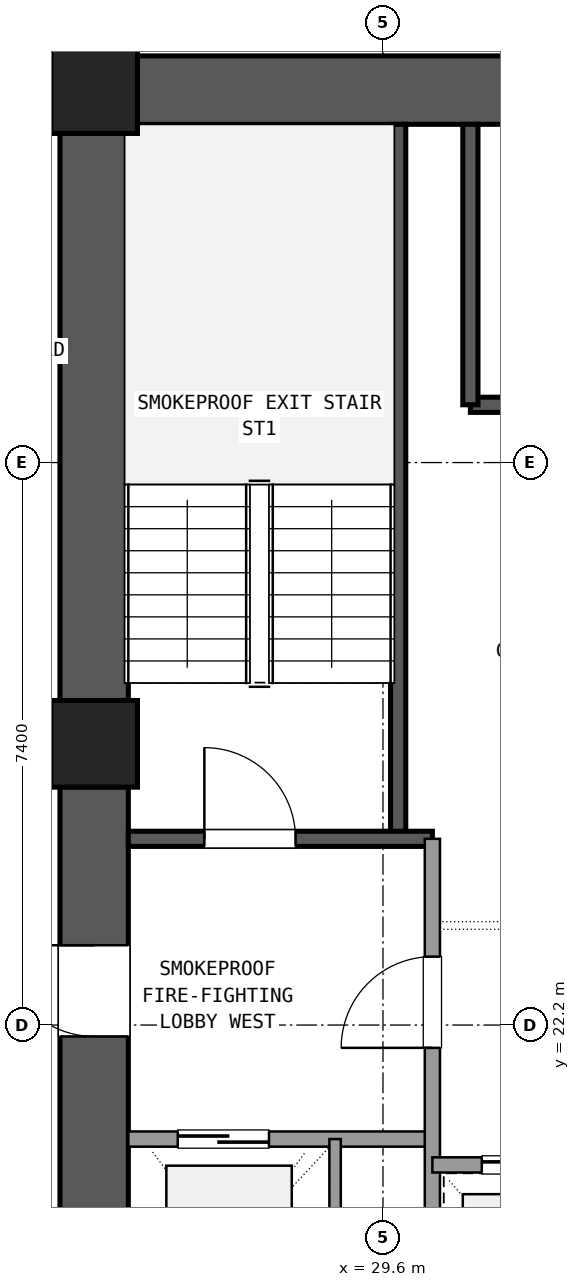
"""IFC4 building model, lengths in metres.
Left out: names, types, materials, properties, quantities, classifications, styles, units other than length and angle.
Written with IfcOpenShell. Run it as: python <this file> out.ifc"""

import sys

from ifc_helpers import new_model, si_unit, direction, frame, frame_2d, origin, origin_2d, place, context, subcontext, project, spatial, rectangle, extrude, element, fill, save


model = new_model("IFC4")
c1 = context("Model", 3, precision=1e-05, world=origin(), true_north=direction((0.0, 1.0)))
c2 = subcontext(c1, "Body", "Model", "MODEL_VIEW")
j1 = project(units=[si_unit("LENGTHUNIT", "METRE"), si_unit("PLANEANGLEUNIT", "RADIAN")], contexts=[c1])
p1 = place(None, origin())
s1 = spatial("IfcSite", under=j1, at=p1, CompositionType="ELEMENT")
p2 = place(p1, origin())
s2 = spatial("IfcBuilding", under=s1, at=p2, CompositionType="ELEMENT")
p3 = place(p2, frame((0.0, 0.0, 56.34)))
s3 = spatial("IfcBuildingStorey", under=s2, at=p3, CompositionType="ELEMENT", Elevation=56.34)
for number, where, z_axis, x_axis in (
    (1, (25.8, 34.5, 0.0), (0.0, 0.0, 1.0), (1.0, 0.0, 0.0)),
    (2, (25.8, 25.9, 0.0), (0.0, 0.0, 1.0), (1.0, 0.0, 0.0)),
):
    element("IfcColumn", number, at=place(p3, frame(where, z_axis=z_axis, x_axis=x_axis)), inside=s3, PredefinedType="COLUMN", context=c2, shape_type="SweptSolid", body=[
        extrude(rectangle(XDim=1.14, YDim=1.14, at=origin_2d()), origin(), (0.0, 0.0, 1.0), 3.6),
    ])
p4 = place(p3, frame((36.435, 34.5, 0.0), z_axis=(0.0, 0.0, 1.0), x_axis=(-1.0, 0.0, 0.0)))
e3 = element("IfcWall", 3, at=p4, inside=s3, PredefinedType="SHEAR", context=c2, shape_type="SweptSolid", body=[
    extrude(rectangle(XDim=10.07, YDim=0.9, at=frame_2d((5.035, 0.0))), origin(), (0.0, 0.0, 1.0), 3.32),
])
p5 = place(p4, frame((4.035, 0.0, 0.0)))
e4 = element("IfcOpeningElement", 4, at=p5, cuts=e3, PredefinedType="OPENING", context=c2, shape_type="SweptSolid", body=[
    extrude(rectangle(XDim=1.2, YDim=2.15, at=frame_2d((0.6, 1.075))), frame((0.0, 0.46, 0.0), z_axis=(0.0, -1.0, 0.0), x_axis=(1.0, 0.0, 0.0)), (0.0, 0.0, 1.0), 0.92),
])
p6 = place(p3, frame((25.8, 33.935, 0.0), z_axis=(0.0, 0.0, 1.0), x_axis=(0.0, -1.0, 0.0)))
e5 = element("IfcWall", 5, at=p6, inside=s3, PredefinedType="SHEAR", context=c2, shape_type="SweptSolid", body=[
    extrude(rectangle(XDim=7.47, YDim=0.9, at=frame_2d((3.735, 0.0))), origin(), (0.0, 0.0, 1.0), 3.32),
])
p7 = place(p3, frame((25.8, 25.335, 0.0), z_axis=(0.0, 0.0, 1.0), x_axis=(0.0, -1.0, 0.0)))
e6 = element("IfcWall", 6, at=p7, inside=s3, PredefinedType="SHEAR", context=c2, shape_type="SweptSolid", body=[
    extrude(rectangle(XDim=7.47, YDim=0.9, at=frame_2d((3.735, 0.0))), origin(), (0.0, 0.0, 1.0), 3.32),
])
p8 = place(p7, frame((2.085, 0.0, 0.0)))
e7 = element("IfcOpeningElement", 7, at=p8, cuts=e6, PredefinedType="OPENING", context=c2, shape_type="SweptSolid", body=[
    extrude(rectangle(XDim=1.2, YDim=2.15, at=frame_2d((0.6, 1.075))), frame((0.0, 0.46, 0.0), z_axis=(0.0, -1.0, 0.0), x_axis=(1.0, 0.0, 0.0)), (0.0, 0.0, 1.0), 0.92),
])
p9 = place(p3, frame((29.8, 24.65, 0.0), z_axis=(0.0, 0.0, 1.0), x_axis=(0.0, 1.0, 0.0)))
e8 = element("IfcWall", 8, at=p9, inside=s3, PredefinedType="SHEAR", context=c2, shape_type="SweptSolid", body=[
    extrude(rectangle(XDim=9.4, YDim=0.2, at=frame_2d((4.7, 0.0))), origin(), (0.0, 0.0, 1.0), 3.32),
])
p10 = place(p3, frame((26.25, 24.65, 0.0), z_axis=(0.0, 0.0, 1.0), x_axis=(1.0, 0.0, 0.0)))
e9 = element("IfcWall", 9, at=p10, inside=s3, PredefinedType="SHEAR", context=c2, shape_type="SweptSolid", body=[
    extrude(rectangle(XDim=4.0, YDim=0.2, at=frame_2d((2.0, 0.0))), origin(), (0.0, 0.0, 1.0), 3.32),
])
p11 = place(p10, frame((1.0, 0.0, 0.0)))
e10 = element("IfcOpeningElement", 10, at=p11, cuts=e9, PredefinedType="OPENING", context=c2, shape_type="SweptSolid", body=[
    extrude(rectangle(XDim=1.2, YDim=2.15, at=frame_2d((0.6, 1.075))), frame((0.0, 0.11, 0.0), z_axis=(0.0, -1.0, 0.0), x_axis=(1.0, 0.0, 0.0)), (0.0, 0.0, 1.0), 0.22),
])
p12 = place(p3, frame((30.75, 30.36, 0.0), z_axis=(0.0, 0.0, 1.0), x_axis=(1.0, 0.0, 0.0)))
e11 = element("IfcWall", 11, at=p12, inside=s3, PredefinedType="SHEAR", context=c2, shape_type="SweptSolid", body=[
    extrude(rectangle(XDim=9.5, YDim=0.2, at=frame_2d((4.75, 0.0))), origin(), (0.0, 0.0, 1.0), 3.32),
])
p13 = place(p3, frame((30.75, 30.36, 0.0), z_axis=(0.0, 0.0, 1.0), x_axis=(0.0, 1.0, 0.0)))
e12 = element("IfcWall", 12, at=p13, inside=s3, PredefinedType="SHEAR", context=c2, shape_type="SweptSolid", body=[
    extrude(rectangle(XDim=3.69, YDim=0.2, at=frame_2d((1.845, 0.0))), origin(), (0.0, 0.0, 1.0), 3.32),
])
p14 = place(p3, frame((26.25, 20.7, 0.0), z_axis=(0.0, 0.0, 1.0), x_axis=(1.0, 0.0, 0.0)))
e13 = element("IfcWall", 13, at=p14, inside=s3, PredefinedType="SOLIDWALL", context=c2, shape_type="SweptSolid", body=[
    extrude(rectangle(XDim=4.0, YDim=0.2, at=frame_2d((2.0, 0.0))), origin(), (0.0, 0.0, 1.0), 2.61),
])
p15 = place(p14, frame((0.65, 0.0, 0.0)))
e14 = element("IfcOpeningElement", 14, at=p15, cuts=e13, PredefinedType="OPENING", context=c2, shape_type="SweptSolid", body=[
    extrude(rectangle(XDim=1.2, YDim=2.15, at=frame_2d((0.6, 1.075))), frame((0.0, 0.11, 0.0), z_axis=(0.0, -1.0, 0.0), x_axis=(1.0, 0.0, 0.0)), (0.0, 0.0, 1.0), 0.22),
])
p16 = place(p3, frame((30.25, 17.75, 0.0), z_axis=(0.0, 0.0, 1.0), x_axis=(0.0, 1.0, 0.0)))
e15 = element("IfcWall", 15, at=p16, inside=s3, PredefinedType="SOLIDWALL", context=c2, shape_type="SweptSolid", body=[
    extrude(rectangle(XDim=6.9, YDim=0.2, at=frame_2d((3.45, 0.0))), origin(), (0.0, 0.0, 1.0), 2.61),
])
p17 = place(p16, frame((4.15, 0.0, 0.0)))
e16 = element("IfcOpeningElement", 16, at=p17, cuts=e15, PredefinedType="OPENING", context=c2, shape_type="SweptSolid", body=[
    extrude(rectangle(XDim=1.2, YDim=2.15, at=frame_2d((0.6, 1.075))), frame((0.0, 0.11, 0.0), z_axis=(0.0, -1.0, 0.0), x_axis=(1.0, 0.0, 0.0)), (0.0, 0.0, 1.0), 0.22),
])
p18 = place(p3, frame((28.97, 17.75, 0.0), z_axis=(0.0, 0.0, 1.0), x_axis=(0.0, 1.0, 0.0)))
e17 = element("IfcWall", 17, at=p18, inside=s3, PredefinedType="PARTITIONING", context=c2, shape_type="SweptSolid", body=[
    extrude(rectangle(XDim=2.95, YDim=0.15, at=frame_2d((1.475, 0.0))), origin(), (0.0, 0.0, 1.0), 2.61),
])
p19 = place(p3, frame((30.25, 20.36, 0.0), z_axis=(0.0, 0.0, 1.0), x_axis=(1.0, 0.0, 0.0)))
e18 = element("IfcWall", 18, at=p19, inside=s3, PredefinedType="SOLIDWALL", context=c2, shape_type="SweptSolid", body=[
    extrude(rectangle(XDim=7.0, YDim=0.2, at=frame_2d((3.5, 0.0))), origin(), (0.0, 0.0, 1.0), 2.61),
])
p20 = place(p19, frame((0.65, 0.0, 0.0)))
e19 = element("IfcOpeningElement", 19, at=p20, cuts=e18, PredefinedType="OPENING", context=c2, shape_type="SweptSolid", body=[
    extrude(rectangle(XDim=1.1, YDim=2.15, at=frame_2d((0.55, 1.075))), frame((0.0, 0.11, 0.0), z_axis=(0.0, -1.0, 0.0), x_axis=(1.0, 0.0, 0.0)), (0.0, 0.0, 1.0), 0.22),
])
p21 = place(p19, frame((2.95, 0.0, 0.0)))
e20 = element("IfcOpeningElement", 20, at=p21, cuts=e18, PredefinedType="OPENING", context=c2, shape_type="SweptSolid", body=[
    extrude(rectangle(XDim=1.1, YDim=2.15, at=frame_2d((0.55, 1.075))), frame((0.0, 0.11, 0.0), z_axis=(0.0, -1.0, 0.0), x_axis=(1.0, 0.0, 0.0)), (0.0, 0.0, 1.0), 0.22),
])
p22 = place(p19, frame((5.25, 0.0, 0.0)))
e21 = element("IfcOpeningElement", 21, at=p22, cuts=e18, PredefinedType="OPENING", context=c2, shape_type="SweptSolid", body=[
    extrude(rectangle(XDim=1.1, YDim=2.15, at=frame_2d((0.55, 1.075))), frame((0.0, 0.11, 0.0), z_axis=(0.0, -1.0, 0.0), x_axis=(1.0, 0.0, 0.0)), (0.0, 0.0, 1.0), 0.22),
])
p23 = place(p11, origin())
e22 = element("IfcDoor", 22, at=p23, inside=s3, OperationType="SINGLE_SWING_LEFT", PredefinedType="DOOR", context=c2, shape_type="SweptSolid", body=[
    extrude(rectangle(XDim=1.2, YDim=2.15, at=frame_2d((0.6, 1.075))), frame((0.0, 0.025, 0.0), z_axis=(0.0, -1.0, 0.0), x_axis=(1.0, 0.0, 0.0)), (0.0, 0.0, 1.0), 0.05),
])
fill(e10, e22)
p24 = place(p15, origin())
e23 = element("IfcDoor", 23, at=p24, inside=s3, OperationType="SLIDING_TO_LEFT", PredefinedType="DOOR", context=c2, shape_type="SweptSolid", body=[
    extrude(rectangle(XDim=1.2, YDim=2.15, at=frame_2d((0.6, 1.075))), frame((0.0, 0.025, 0.0), z_axis=(0.0, -1.0, 0.0), x_axis=(1.0, 0.0, 0.0)), (0.0, 0.0, 1.0), 0.05),
])
fill(e14, e23)
p25 = place(p17, origin())
e24 = element("IfcDoor", 24, at=p25, inside=s3, OperationType="SINGLE_SWING_LEFT", PredefinedType="DOOR", context=c2, shape_type="SweptSolid", body=[
    extrude(rectangle(XDim=1.2, YDim=2.15, at=frame_2d((0.6, 1.075))), frame((0.0, 0.025, 0.0), z_axis=(0.0, -1.0, 0.0), x_axis=(1.0, 0.0, 0.0)), (0.0, 0.0, 1.0), 0.05),
])
fill(e16, e24)
p26 = place(p8, frame((1.2, 0.0, 0.0), z_axis=(0.0, 0.0, 1.0), x_axis=(-1.0, 0.0, 0.0)))
e25 = element("IfcDoor", 25, at=p26, inside=s3, OperationType="SINGLE_SWING_LEFT", PredefinedType="DOOR", context=c2, shape_type="SweptSolid", body=[
    extrude(rectangle(XDim=1.2, YDim=2.15, at=frame_2d((0.6, 1.075))), frame((0.0, 0.025, 0.0), z_axis=(0.0, -1.0, 0.0), x_axis=(1.0, 0.0, 0.0)), (0.0, 0.0, 1.0), 0.05),
])
fill(e7, e25)
p27 = place(p20, origin())
e26 = element("IfcDoor", 26, at=p27, inside=s3, OperationType="SLIDING_TO_LEFT", PredefinedType="DOOR", context=c2, shape_type="SweptSolid", body=[
    extrude(rectangle(XDim=1.1, YDim=2.15, at=frame_2d((0.55, 1.075))), frame((0.0, 0.025, 0.0), z_axis=(0.0, -1.0, 0.0), x_axis=(1.0, 0.0, 0.0)), (0.0, 0.0, 1.0), 0.05),
])
fill(e19, e26)
save(model, sys.argv[1])
